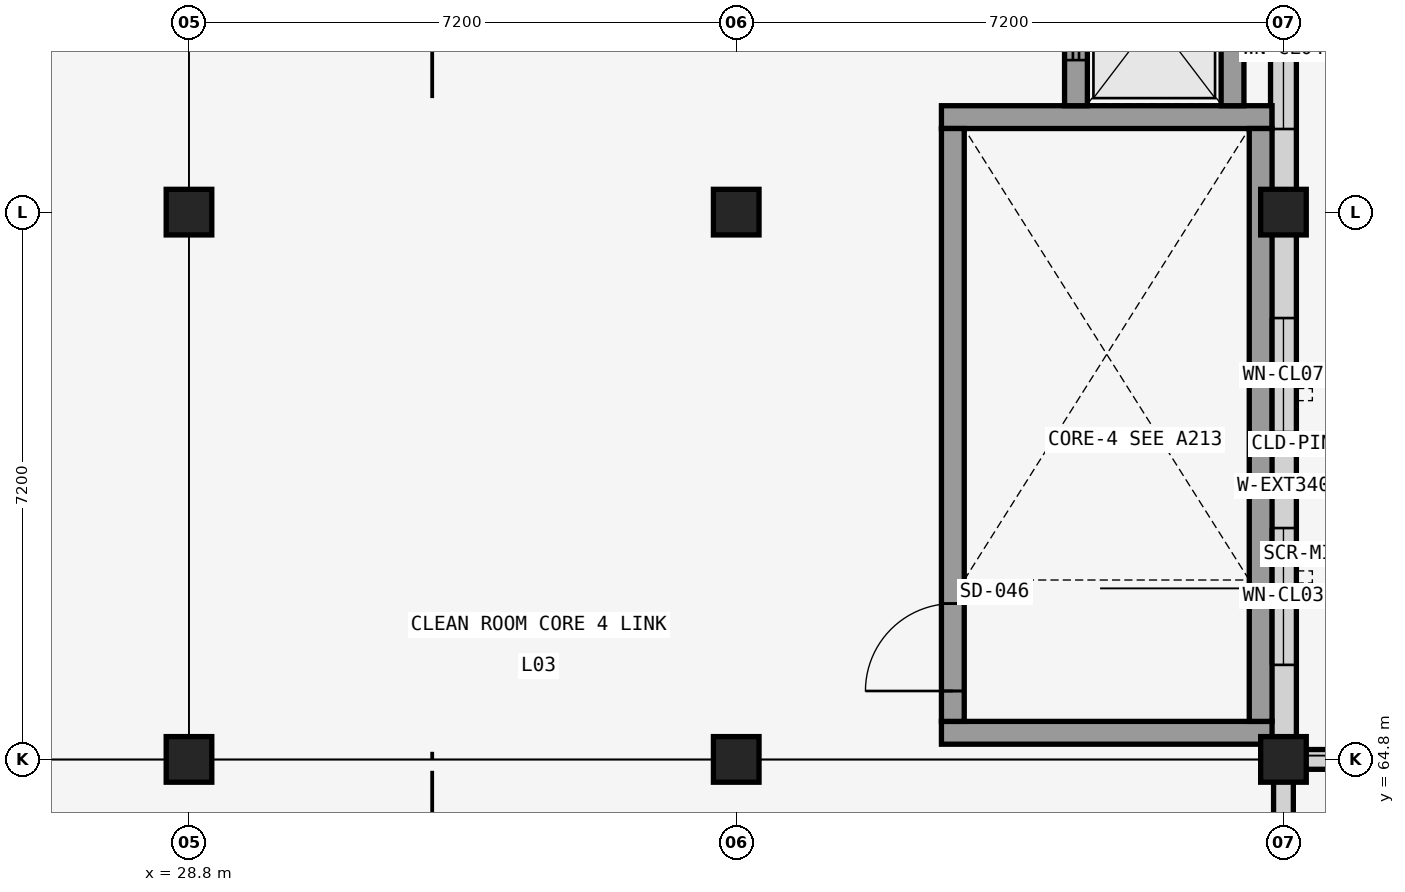
"""IFC4 building model, lengths in metres.
Left out: names, types, materials, properties, quantities, classifications, styles, units other than length and angle.
Written with IfcOpenShell. Run it as: python <this file> out.ifc"""

import sys

from ifc_helpers import new_model, si_unit, direction, frame, frame_2d, origin, origin_2d, place, context, subcontext, project, spatial, polyline, rectangle, outline, extrude, element, fill, save


model = new_model("IFC4")
c1 = context("Model", 3, precision=1e-05, world=origin(), true_north=direction((0.0, 1.0)))
c2 = subcontext(c1, "Body", "Model", "MODEL_VIEW")
j1 = project(units=[si_unit("LENGTHUNIT", "METRE"), si_unit("PLANEANGLEUNIT", "RADIAN")], contexts=[c1])
p1 = place(None, origin())
s1 = spatial("IfcSite", under=j1, at=p1, CompositionType="ELEMENT")
p2 = place(p1, origin())
s2 = spatial("IfcBuilding", under=s1, at=p2, CompositionType="ELEMENT")
p3 = place(p2, frame((0.0, 0.0, 13.12)))
s3 = spatial("IfcBuildingStorey", under=s2, at=p3, CompositionType="ELEMENT", Elevation=13.12)
for number, where, z_axis, x_axis in (
    (1, (28.8, 64.8, 0.0), (0.0, 0.0, 1.0), (1.0, 0.0, 0.0)),
    (2, (28.8, 72.0, 0.0), (0.0, 0.0, 1.0), (1.0, 0.0, 0.0)),
    (3, (36.0, 64.8, 0.0), (0.0, 0.0, 1.0), (1.0, 0.0, 0.0)),
    (4, (36.0, 72.0, 0.0), (0.0, 0.0, 1.0), (1.0, 0.0, 0.0)),
    (5, (43.2, 64.8, 0.0), (0.0, 0.0, 1.0), (1.0, 0.0, 0.0)),
    (6, (43.2, 72.0, 0.0), (0.0, 0.0, 1.0), (1.0, 0.0, 0.0)),
):
    element("IfcColumn", number, at=place(p3, frame(where, z_axis=z_axis, x_axis=x_axis)), inside=s3, PredefinedType="COLUMN", context=c2, shape_type="SweptSolid", body=[
        extrude(rectangle(XDim=0.6, YDim=0.6, at=origin_2d()), origin(), (0.0, 0.0, 1.0), 4.16),
    ])
p4 = place(p3, frame((43.2, 65.09, 0.0), z_axis=(0.0, 0.0, 1.0), x_axis=(0.0, 1.0, 0.0)))
e7 = element("IfcWall", 7, at=p4, inside=s3, PredefinedType="SOLIDWALL", context=c2, shape_type="SweptSolid", body=[
    extrude(rectangle(XDim=6.62, YDim=0.34, at=frame_2d((3.31, 0.0))), origin(), (0.0, 0.0, 1.0), 3.16),
])
p5 = place(p4, frame((0.954, 0.0, 1.0)))
e8 = element("IfcOpeningElement", 8, at=p5, cuts=e7, PredefinedType="OPENING", context=c2, shape_type="SweptSolid", body=[
    extrude(rectangle(XDim=1.8, YDim=1.5, at=frame_2d((0.9, 0.75))), frame((0.0, 0.18, 0.0), z_axis=(0.0, -1.0, 0.0), x_axis=(1.0, 0.0, 0.0)), (0.0, 0.0, 1.0), 0.36),
])
p6 = place(p4, frame((4.016, 0.0, 1.0)))
e9 = element("IfcOpeningElement", 9, at=p6, cuts=e7, PredefinedType="OPENING", context=c2, shape_type="SweptSolid", body=[
    extrude(rectangle(XDim=1.5, YDim=1.65, at=frame_2d((0.75, 0.825))), frame((0.0, 0.18, 0.0), z_axis=(0.0, -1.0, 0.0), x_axis=(1.0, 0.0, 0.0)), (0.0, 0.0, 1.0), 0.36),
])
p7 = place(p3, frame((43.2, 72.29, 0.0), z_axis=(0.0, 0.0, 1.0), x_axis=(0.0, 1.0, 0.0)))
e10 = element("IfcWall", 10, at=p7, inside=s3, PredefinedType="SOLIDWALL", context=c2, shape_type="SweptSolid", body=[
    extrude(rectangle(XDim=6.62, YDim=0.34, at=frame_2d((3.31, 0.0))), origin(), (0.0, 0.0, 1.0), 3.16),
])
p8 = place(p7, frame((0.804, 0.0, 1.0)))
e11 = element("IfcOpeningElement", 11, at=p8, cuts=e10, PredefinedType="OPENING", context=c2, shape_type="SweptSolid", body=[
    extrude(rectangle(XDim=2.1, YDim=1.5, at=frame_2d((1.05, 0.75))), frame((0.0, 0.18, 0.0), z_axis=(0.0, -1.0, 0.0), x_axis=(1.0, 0.0, 0.0)), (0.0, 0.0, 1.0), 0.36),
])
p9 = place(p7, frame((3.866, 0.0, 1.0)))
e12 = element("IfcOpeningElement", 12, at=p9, cuts=e10, PredefinedType="OPENING", context=c2, shape_type="SweptSolid", body=[
    extrude(rectangle(XDim=1.8, YDim=1.65, at=frame_2d((0.9, 0.825))), frame((0.0, 0.18, 0.0), z_axis=(0.0, -1.0, 0.0), x_axis=(1.0, 0.0, 0.0)), (0.0, 0.0, 1.0), 0.36),
])
p10 = place(p3, frame((43.2, 64.8, 4.16), z_axis=(0.0, 0.0, 1.0), x_axis=(1.0, 0.0, 0.0)))
e13 = element("IfcWall", 13, at=p10, inside=s3, PredefinedType="SOLIDWALL", context=c2, shape_type="SweptSolid", body=[
    extrude(rectangle(XDim=14.4, YDim=0.26, at=frame_2d((7.2, 0.0))), origin(), (0.0, 0.0, 1.0), 3.99),
])
p11 = place(p10, frame((1.932, 0.0, 0.4)))
e14 = element("IfcOpeningElement", 14, at=p11, cuts=e13, PredefinedType="OPENING", context=c2, shape_type="SweptSolid", body=[
    extrude(rectangle(XDim=4.2, YDim=2.6, at=frame_2d((2.1, 1.3))), frame((0.0, 0.14, 0.0), z_axis=(0.0, -1.0, 0.0), x_axis=(1.0, 0.0, 0.0)), (0.0, 0.0, 1.0), 0.28),
])
p12 = place(p10, frame((8.268, 0.0, 0.4)))
e15 = element("IfcOpeningElement", 15, at=p12, cuts=e13, PredefinedType="OPENING", context=c2, shape_type="SweptSolid", body=[
    extrude(rectangle(XDim=4.2, YDim=2.6, at=frame_2d((2.1, 1.3))), frame((0.0, 0.14, 0.0), z_axis=(0.0, -1.0, 0.0), x_axis=(1.0, 0.0, 0.0)), (0.0, 0.0, 1.0), 0.28),
])
p13 = place(p3, frame((43.2, 57.6, 4.16), z_axis=(0.0, 0.0, 1.0), x_axis=(0.0, 1.0, 0.0)))
e16 = element("IfcWall", 16, at=p13, inside=s3, PredefinedType="SOLIDWALL", context=c2, shape_type="SweptSolid", body=[
    extrude(outline(polyline([(0.0, 0.0), (7.2, 0.0), (7.2, 0.12), (7.16, 4.24), (0.0, 0.12), (0.0, 0.0)])), frame((0.0, 0.13, 0.0), z_axis=(0.0, -1.0, 0.0), x_axis=(1.0, 0.0, 0.0)), (0.0, 0.0, 1.0), 0.26),
])
for number, where, z_axis, x_axis in (
    (17, (38.7, 65.15, 0.0), (0.0, 0.0, 1.0), (1.0, 0.0, 0.0)),
    (18, (38.7, 73.25, 0.0), (0.0, 0.0, 1.0), (1.0, 0.0, 0.0)),
):
    element("IfcWall", number, at=place(p3, frame(where, z_axis=z_axis, x_axis=x_axis)), inside=s3, PredefinedType="SHEAR", context=c2, shape_type="SweptSolid", body=[
        extrude(rectangle(XDim=4.35, YDim=0.3, at=frame_2d((2.175, 0.0))), origin(), (0.0, 0.0, 1.0), 3.81),
    ])
p14 = place(p3, frame((38.85, 65.3, 0.0), z_axis=(0.0, 0.0, 1.0), x_axis=(0.0, 1.0, 0.0)))
e19 = element("IfcWall", 19, at=p14, inside=s3, PredefinedType="SHEAR", context=c2, shape_type="SweptSolid", body=[
    extrude(rectangle(XDim=7.8, YDim=0.3, at=frame_2d((3.9, 0.0))), origin(), (0.0, 0.0, 1.0), 3.81),
])
p15 = place(p14, frame((0.4, 0.0, 0.0)))
e20 = element("IfcOpeningElement", 20, at=p15, cuts=e19, PredefinedType="OPENING", context=c2, shape_type="SweptSolid", body=[
    extrude(rectangle(XDim=1.15, YDim=2.2, at=frame_2d((0.575, 1.1))), frame((0.0, 0.16, 0.0), z_axis=(0.0, -1.0, 0.0), x_axis=(1.0, 0.0, 0.0)), (0.0, 0.0, 1.0), 0.32),
])
p16 = place(p3, frame((42.9, 65.3, 0.0), z_axis=(0.0, 0.0, 1.0), x_axis=(0.0, 1.0, 0.0)))
e21 = element("IfcWall", 21, at=p16, inside=s3, PredefinedType="SHEAR", context=c2, shape_type="SweptSolid", body=[
    extrude(rectangle(XDim=7.8, YDim=0.3, at=frame_2d((3.9, 0.0))), origin(), (0.0, 0.0, 1.0), 3.81),
])
p17 = place(p3, frame((40.47, 73.4, 0.0), z_axis=(0.0, 0.0, 1.0), x_axis=(0.0, 1.0, 0.0)))
e22 = element("IfcWall", 22, at=p17, inside=s3, PredefinedType="SHEAR", context=c2, shape_type="SweptSolid", body=[
    extrude(rectangle(XDim=2.28, YDim=0.3, at=frame_2d((1.14, 0.0))), origin(), (0.0, 0.0, 1.0), 3.81),
])
p18 = place(p17, frame((0.6, 0.0, 0.0)))
e23 = element("IfcOpeningElement", 23, at=p18, cuts=e22, PredefinedType="OPENING", context=c2, shape_type="SweptSolid", body=[
    extrude(rectangle(XDim=1.1, YDim=2.2, at=frame_2d((0.55, 1.1))), frame((0.0, 0.16, 0.0), z_axis=(0.0, -1.0, 0.0), x_axis=(1.0, 0.0, 0.0)), (0.0, 0.0, 1.0), 0.32),
])
p19 = place(p3, frame((42.53, 73.4, 0.0), z_axis=(0.0, 0.0, 1.0), x_axis=(0.0, 1.0, 0.0)))
e24 = element("IfcWall", 24, at=p19, inside=s3, PredefinedType="SHEAR", context=c2, shape_type="SweptSolid", body=[
    extrude(rectangle(XDim=2.28, YDim=0.3, at=frame_2d((1.14, 0.0))), origin(), (0.0, 0.0, 1.0), 3.81),
])
p20 = place(p5, origin())
e25 = element("IfcWindow", 25, at=p20, inside=s3, PartitioningType="SINGLE_PANEL", PredefinedType="WINDOW", context=c2, shape_type="SweptSolid", body=[
    extrude(rectangle(XDim=1.8, YDim=1.5, at=frame_2d((0.9, 0.75))), frame((0.0, 0.03, 0.0), z_axis=(0.0, -1.0, 0.0), x_axis=(1.0, 0.0, 0.0)), (0.0, 0.0, 1.0), 0.06),
])
fill(e8, e25)
p21 = place(p6, origin())
e26 = element("IfcWindow", 26, at=p21, inside=s3, PartitioningType="SINGLE_PANEL", PredefinedType="WINDOW", context=c2, shape_type="SweptSolid", body=[
    extrude(rectangle(XDim=1.5, YDim=1.65, at=frame_2d((0.75, 0.825))), frame((0.0, 0.03, 0.0), z_axis=(0.0, -1.0, 0.0), x_axis=(1.0, 0.0, 0.0)), (0.0, 0.0, 1.0), 0.06),
])
fill(e9, e26)
p22 = place(p8, origin())
e27 = element("IfcWindow", 27, at=p22, inside=s3, PartitioningType="SINGLE_PANEL", PredefinedType="WINDOW", context=c2, shape_type="SweptSolid", body=[
    extrude(rectangle(XDim=2.1, YDim=1.5, at=frame_2d((1.05, 0.75))), frame((0.0, 0.03, 0.0), z_axis=(0.0, -1.0, 0.0), x_axis=(1.0, 0.0, 0.0)), (0.0, 0.0, 1.0), 0.06),
])
fill(e11, e27)
p23 = place(p15, frame((1.15, 0.0, 0.0), z_axis=(0.0, 0.0, 1.0), x_axis=(-1.0, 0.0, 0.0)))
e28 = element("IfcDoor", 28, at=p23, inside=s3, OperationType="SINGLE_SWING_LEFT", PredefinedType="DOOR", context=c2, shape_type="SweptSolid", body=[
    extrude(rectangle(XDim=1.15, YDim=2.2, at=frame_2d((0.575, 1.1))), frame((0.0, 0.025, 0.0), z_axis=(0.0, -1.0, 0.0), x_axis=(1.0, 0.0, 0.0)), (0.0, 0.0, 1.0), 0.05),
])
fill(e20, e28)
p24 = place(p18, origin())
e29 = element("IfcDoor", 29, at=p24, inside=s3, OperationType="SLIDING_TO_LEFT", PredefinedType="DOOR", context=c2, shape_type="SweptSolid", body=[
    extrude(rectangle(XDim=1.1, YDim=2.2, at=frame_2d((0.55, 1.1))), frame((0.0, 0.025, 0.0), z_axis=(0.0, -1.0, 0.0), x_axis=(1.0, 0.0, 0.0)), (0.0, 0.0, 1.0), 0.05),
])
fill(e23, e29)
save(model, sys.argv[1])
